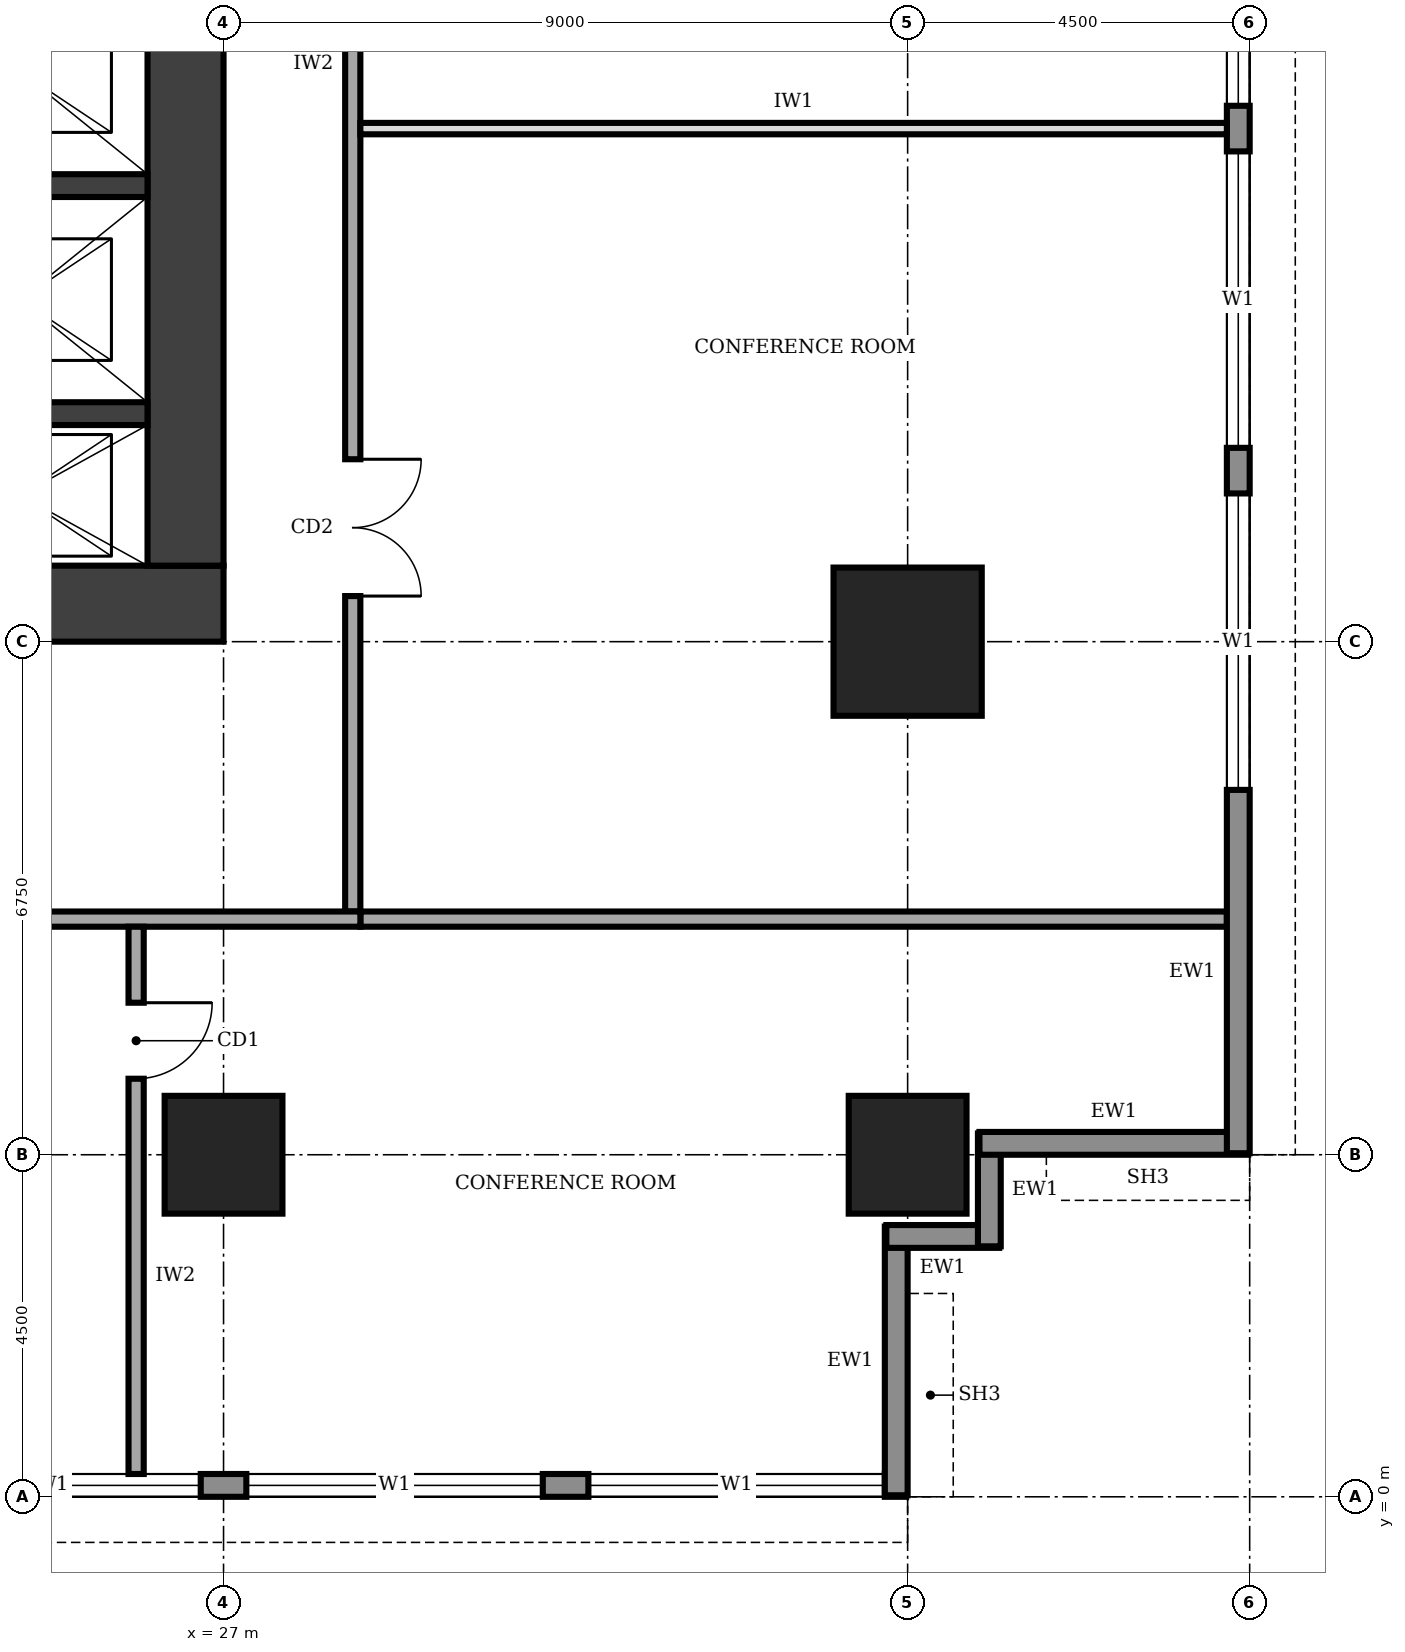
"""IFC4 building model, lengths in metres.
Left out: names, types, materials, properties, quantities, classifications, styles, units other than length and angle.
Written with IfcOpenShell. Run it as: python <this file> out.ifc"""

import sys

from ifc_helpers import new_model, si_unit, direction, frame, frame_2d, origin, origin_2d, place, context, subcontext, project, spatial, rectangle, extrude, element, fill, save


model = new_model("IFC4")
c1 = context("Model", 3, precision=1e-05, world=origin(), true_north=direction((0.0, 1.0)))
c2 = subcontext(c1, "Body", "Model", "MODEL_VIEW")
j1 = project(units=[si_unit("LENGTHUNIT", "METRE"), si_unit("PLANEANGLEUNIT", "RADIAN")], contexts=[c1])
p1 = place(None, origin())
s1 = spatial("IfcSite", under=j1, at=p1, CompositionType="ELEMENT")
p2 = place(p1, origin())
s2 = spatial("IfcBuilding", under=s1, at=p2, CompositionType="ELEMENT")
p3 = place(p2, frame((0.0, 0.0, 213.0)))
s3 = spatial("IfcBuildingStorey", under=s2, at=p3, CompositionType="ELEMENT", Elevation=213.0)
p4 = place(p3, frame((13.5, 11.75, 0.0), z_axis=(0.0, 0.0, 1.0), x_axis=(1.0, 0.0, 0.0)))
e1 = element("IfcWall", 1, at=p4, inside=s3, PredefinedType="SHEAR", context=c2, shape_type="SweptSolid", body=[
    extrude(rectangle(XDim=13.5, YDim=1.0, at=frame_2d((6.75, 0.0))), origin(), (0.0, 0.0, 1.0), 4.0),
])
p5 = place(p4, frame((4.75, 0.0, 0.0)))
e2 = element("IfcOpeningElement", 2, at=p5, cuts=e1, PredefinedType="OPENING", context=c2, shape_type="SweptSolid", body=[
    extrude(rectangle(XDim=1.0, YDim=2.1, at=frame_2d((0.5, 1.05))), frame((0.0, 0.51, 0.0), z_axis=(0.0, -1.0, 0.0), x_axis=(1.0, 0.0, 0.0)), (0.0, 0.0, 1.0), 1.02),
])
p6 = place(p3, frame((26.5, 12.25, 0.0), z_axis=(0.0, 0.0, 1.0), x_axis=(0.0, 1.0, 0.0)))
e3 = element("IfcWall", 3, at=p6, inside=s3, PredefinedType="SHEAR", context=c2, shape_type="SweptSolid", body=[
    extrude(rectangle(XDim=16.0, YDim=1.0, at=frame_2d((8.0, 0.0))), origin(), (0.0, 0.0, 1.0), 4.0),
])
for number, where, z_axis, x_axis in (
    (4, (22.65, 14.25, 0.0), (0.0, 0.0, 1.0), (1.0, 0.0, 0.0)),
    (5, (22.65, 17.25, 0.0), (0.0, 0.0, 1.0), (1.0, 0.0, 0.0)),
):
    element("IfcWall", number, at=place(p3, frame(where, z_axis=z_axis, x_axis=x_axis)), inside=s3, PredefinedType="SHEAR", context=c2, shape_type="SweptSolid", body=[
        extrude(rectangle(XDim=3.35, YDim=0.3, at=frame_2d((1.675, 0.0))), origin(), (0.0, 0.0, 1.0), 4.0),
    ])
for number, where, z_axis, x_axis in (
    (6, (27.0, 4.5, 0.0), (0.0, 0.0, 1.0), (1.0, 0.0, 0.0)),
    (7, (36.0, 4.5, 0.0), (0.0, 0.0, 1.0), (1.0, 0.0, 0.0)),
):
    element("IfcColumn", number, at=place(p3, frame(where, z_axis=z_axis, x_axis=x_axis)), inside=s3, PredefinedType="COLUMN", context=c2, shape_type="SweptSolid", body=[
        extrude(rectangle(XDim=1.55, YDim=1.55, at=origin_2d()), origin(), (0.0, 0.0, 1.0), 4.0),
    ])
p7 = place(p3, frame((36.0, 11.25, 0.0), z_axis=(0.0, 0.0, 1.0), x_axis=(1.0, 0.0, 0.0)))
e8 = element("IfcColumn", 8, at=p7, inside=s3, PredefinedType="COLUMN", context=c2, shape_type="SweptSolid", body=[
    extrude(rectangle(XDim=1.95, YDim=1.95, at=origin_2d()), origin(), (0.0, 0.0, 1.0), 4.0),
])
p8 = place(p3, frame((4.52, 0.15, 0.0), z_axis=(0.0, 0.0, 1.0), x_axis=(1.0, 0.0, 0.0)))
e9 = element("IfcWall", 9, at=p8, inside=s3, PredefinedType="STANDARD", context=c2, shape_type="SweptSolid", body=[
    extrude(rectangle(XDim=31.46, YDim=0.3, at=frame_2d((15.73, 0.0))), origin(), (0.0, 0.0, 1.0), 3.75),
])
p9 = place(p8, frame((4.78, 0.0, 0.9)))
e10 = element("IfcOpeningElement", 10, at=p9, cuts=e9, PredefinedType="OPENING", context=c2, shape_type="SweptSolid", body=[
    extrude(rectangle(XDim=3.9, YDim=2.2, at=frame_2d((1.95, 1.1))), frame((0.0, 0.16, 0.0), z_axis=(0.0, -1.0, 0.0), x_axis=(1.0, 0.0, 0.0)), (0.0, 0.0, 1.0), 0.32),
])
p10 = place(p8, frame((9.28, 0.0, 0.9)))
e11 = element("IfcOpeningElement", 11, at=p10, cuts=e9, PredefinedType="OPENING", context=c2, shape_type="SweptSolid", body=[
    extrude(rectangle(XDim=3.9, YDim=2.2, at=frame_2d((1.95, 1.1))), frame((0.0, 0.16, 0.0), z_axis=(0.0, -1.0, 0.0), x_axis=(1.0, 0.0, 0.0)), (0.0, 0.0, 1.0), 0.32),
])
p11 = place(p8, frame((13.78, 0.0, 0.9)))
e12 = element("IfcOpeningElement", 12, at=p11, cuts=e9, PredefinedType="OPENING", context=c2, shape_type="SweptSolid", body=[
    extrude(rectangle(XDim=3.9, YDim=2.2, at=frame_2d((1.95, 1.1))), frame((0.0, 0.16, 0.0), z_axis=(0.0, -1.0, 0.0), x_axis=(1.0, 0.0, 0.0)), (0.0, 0.0, 1.0), 0.32),
])
p12 = place(p8, frame((18.28, 0.0, 0.9)))
e13 = element("IfcOpeningElement", 13, at=p12, cuts=e9, PredefinedType="OPENING", context=c2, shape_type="SweptSolid", body=[
    extrude(rectangle(XDim=3.9, YDim=2.2, at=frame_2d((1.95, 1.1))), frame((0.0, 0.16, 0.0), z_axis=(0.0, -1.0, 0.0), x_axis=(1.0, 0.0, 0.0)), (0.0, 0.0, 1.0), 0.32),
])
p13 = place(p8, frame((22.78, 0.0, 0.9)))
e14 = element("IfcOpeningElement", 14, at=p13, cuts=e9, PredefinedType="OPENING", context=c2, shape_type="SweptSolid", body=[
    extrude(rectangle(XDim=3.9, YDim=2.2, at=frame_2d((1.95, 1.1))), frame((0.0, 0.16, 0.0), z_axis=(0.0, -1.0, 0.0), x_axis=(1.0, 0.0, 0.0)), (0.0, 0.0, 1.0), 0.32),
])
p14 = place(p8, frame((27.28, 0.0, 0.9)))
e15 = element("IfcOpeningElement", 15, at=p14, cuts=e9, PredefinedType="OPENING", context=c2, shape_type="SweptSolid", body=[
    extrude(rectangle(XDim=3.9, YDim=2.2, at=frame_2d((1.95, 1.1))), frame((0.0, 0.16, 0.0), z_axis=(0.0, -1.0, 0.0), x_axis=(1.0, 0.0, 0.0)), (0.0, 0.0, 1.0), 0.32),
])
p15 = place(p3, frame((35.85, 0.02, 0.0), z_axis=(0.0, 0.0, 1.0), x_axis=(0.0, 1.0, 0.0)))
e16 = element("IfcWall", 16, at=p15, inside=s3, PredefinedType="STANDARD", context=c2, shape_type="SweptSolid", body=[
    extrude(rectangle(XDim=3.535, YDim=0.3, at=frame_2d((1.768, 0.0))), origin(), (0.0, 0.0, 1.0), 2.85),
])
for number, where, z_axis, x_axis in (
    (17, (35.72, 3.425, 0.0), (0.0, 0.0, 1.0), (1.0, 0.0, 0.0)),
    (18, (37.075, 3.295, 0.0), (0.0, 0.0, 1.0), (0.0, 1.0, 0.0)),
):
    element("IfcWall", number, at=place(p3, frame(where, z_axis=z_axis, x_axis=x_axis)), inside=s3, PredefinedType="STANDARD", context=c2, shape_type="SweptSolid", body=[
        extrude(rectangle(XDim=1.485, YDim=0.3, at=frame_2d((0.743, 0.0))), origin(), (0.0, 0.0, 1.0), 3.75),
    ])
p16 = place(p3, frame((36.945, 4.65, 0.0), z_axis=(0.0, 0.0, 1.0), x_axis=(1.0, 0.0, 0.0)))
e19 = element("IfcWall", 19, at=p16, inside=s3, PredefinedType="STANDARD", context=c2, shape_type="SweptSolid", body=[
    extrude(rectangle(XDim=3.535, YDim=0.3, at=frame_2d((1.768, 0.0))), origin(), (0.0, 0.0, 1.0), 2.85),
])
p17 = place(p3, frame((40.35, 4.52, 0.0), z_axis=(0.0, 0.0, 1.0), x_axis=(0.0, 1.0, 0.0)))
e20 = element("IfcWall", 20, at=p17, inside=s3, PredefinedType="STANDARD", context=c2, shape_type="SweptSolid", body=[
    extrude(rectangle(XDim=31.46, YDim=0.3, at=frame_2d((15.73, 0.0))), origin(), (0.0, 0.0, 1.0), 3.75),
])
p18 = place(p17, frame((4.78, 0.0, 0.9)))
e21 = element("IfcOpeningElement", 21, at=p18, cuts=e20, PredefinedType="OPENING", context=c2, shape_type="SweptSolid", body=[
    extrude(rectangle(XDim=3.9, YDim=2.2, at=frame_2d((1.95, 1.1))), frame((0.0, 0.16, 0.0), z_axis=(0.0, -1.0, 0.0), x_axis=(1.0, 0.0, 0.0)), (0.0, 0.0, 1.0), 0.32),
])
p19 = place(p17, frame((9.28, 0.0, 0.9)))
e22 = element("IfcOpeningElement", 22, at=p19, cuts=e20, PredefinedType="OPENING", context=c2, shape_type="SweptSolid", body=[
    extrude(rectangle(XDim=3.9, YDim=2.2, at=frame_2d((1.95, 1.1))), frame((0.0, 0.16, 0.0), z_axis=(0.0, -1.0, 0.0), x_axis=(1.0, 0.0, 0.0)), (0.0, 0.0, 1.0), 0.32),
])
p20 = place(p17, frame((13.78, 0.0, 0.9)))
e23 = element("IfcOpeningElement", 23, at=p20, cuts=e20, PredefinedType="OPENING", context=c2, shape_type="SweptSolid", body=[
    extrude(rectangle(XDim=3.9, YDim=2.2, at=frame_2d((1.95, 1.1))), frame((0.0, 0.16, 0.0), z_axis=(0.0, -1.0, 0.0), x_axis=(1.0, 0.0, 0.0)), (0.0, 0.0, 1.0), 0.32),
])
p21 = place(p17, frame((18.28, 0.0, 0.9)))
e24 = element("IfcOpeningElement", 24, at=p21, cuts=e20, PredefinedType="OPENING", context=c2, shape_type="SweptSolid", body=[
    extrude(rectangle(XDim=3.9, YDim=2.2, at=frame_2d((1.95, 1.1))), frame((0.0, 0.16, 0.0), z_axis=(0.0, -1.0, 0.0), x_axis=(1.0, 0.0, 0.0)), (0.0, 0.0, 1.0), 0.32),
])
p22 = place(p17, frame((22.78, 0.0, 0.9)))
e25 = element("IfcOpeningElement", 25, at=p22, cuts=e20, PredefinedType="OPENING", context=c2, shape_type="SweptSolid", body=[
    extrude(rectangle(XDim=3.9, YDim=2.2, at=frame_2d((1.95, 1.1))), frame((0.0, 0.16, 0.0), z_axis=(0.0, -1.0, 0.0), x_axis=(1.0, 0.0, 0.0)), (0.0, 0.0, 1.0), 0.32),
])
p23 = place(p17, frame((27.28, 0.0, 0.9)))
e26 = element("IfcOpeningElement", 26, at=p23, cuts=e20, PredefinedType="OPENING", context=c2, shape_type="SweptSolid", body=[
    extrude(rectangle(XDim=3.9, YDim=2.2, at=frame_2d((1.95, 1.1))), frame((0.0, 0.16, 0.0), z_axis=(0.0, -1.0, 0.0), x_axis=(1.0, 0.0, 0.0)), (0.0, 0.0, 1.0), 0.32),
])
p24 = place(p3, frame((11.9, 7.6, 0.0), z_axis=(0.0, 0.0, 1.0), x_axis=(1.0, 0.0, 0.0)))
e27 = element("IfcWall", 27, at=p24, inside=s3, PredefinedType="SOLIDWALL", context=c2, shape_type="SweptSolid", body=[
    extrude(rectangle(XDim=16.9, YDim=0.2, at=frame_2d((8.45, 0.0))), origin(), (0.0, 0.0, 1.0), 3.75),
])
p25 = place(p3, frame((28.7, 7.7, 0.0), z_axis=(0.0, 0.0, 1.0), x_axis=(0.0, 1.0, 0.0)))
e28 = element("IfcWall", 28, at=p25, inside=s3, PredefinedType="SOLIDWALL", context=c2, shape_type="SweptSolid", body=[
    extrude(rectangle(XDim=23.8, YDim=0.2, at=frame_2d((11.9, 0.0))), origin(), (0.0, 0.0, 1.0), 3.75),
])
p26 = place(p25, frame((4.15, 0.0, 0.0)))
e29 = element("IfcOpeningElement", 29, at=p26, cuts=e28, PredefinedType="OPENING", context=c2, shape_type="SweptSolid", body=[
    extrude(rectangle(XDim=1.8, YDim=2.1, at=frame_2d((0.9, 1.05))), frame((0.0, 0.11, 0.0), z_axis=(0.0, -1.0, 0.0), x_axis=(1.0, 0.0, 0.0)), (0.0, 0.0, 1.0), 0.22),
])
p27 = place(p25, frame((16.35, 0.0, 0.0)))
e30 = element("IfcOpeningElement", 30, at=p27, cuts=e28, PredefinedType="OPENING", context=c2, shape_type="SweptSolid", body=[
    extrude(rectangle(XDim=1.4, YDim=2.1, at=frame_2d((0.7, 1.05))), frame((0.0, 0.11, 0.0), z_axis=(0.0, -1.0, 0.0), x_axis=(1.0, 0.0, 0.0)), (0.0, 0.0, 1.0), 0.22),
])
p28 = place(p3, frame((25.85, 7.5, 0.0), z_axis=(0.0, 0.0, 1.0), x_axis=(0.0, -1.0, 0.0)))
e31 = element("IfcWall", 31, at=p28, inside=s3, PredefinedType="SOLIDWALL", context=c2, shape_type="SweptSolid", body=[
    extrude(rectangle(XDim=7.2, YDim=0.2, at=frame_2d((3.6, 0.0))), origin(), (0.0, 0.0, 1.0), 3.75),
])
p29 = place(p28, frame((1.0, 0.0, 0.0)))
e32 = element("IfcOpeningElement", 32, at=p29, cuts=e31, PredefinedType="OPENING", context=c2, shape_type="SweptSolid", body=[
    extrude(rectangle(XDim=1.0, YDim=2.1, at=frame_2d((0.5, 1.05))), frame((0.0, 0.11, 0.0), z_axis=(0.0, -1.0, 0.0), x_axis=(1.0, 0.0, 0.0)), (0.0, 0.0, 1.0), 0.22),
])
p30 = place(p3, frame((28.8, 7.6, 0.0), z_axis=(0.0, 0.0, 1.0), x_axis=(1.0, 0.0, 0.0)))
e33 = element("IfcWall", 33, at=p30, inside=s3, PredefinedType="SOLIDWALL", context=c2, shape_type="SweptSolid", body=[
    extrude(rectangle(XDim=11.4, YDim=0.2, at=frame_2d((5.7, 0.0))), origin(), (0.0, 0.0, 1.0), 3.75),
])
p31 = place(p3, frame((28.8, 18.0, 0.0), z_axis=(0.0, 0.0, 1.0), x_axis=(1.0, 0.0, 0.0)))
e34 = element("IfcWall", 34, at=p31, inside=s3, PredefinedType="PARTITIONING", context=c2, shape_type="SweptSolid", body=[
    extrude(rectangle(XDim=11.4, YDim=0.15, at=frame_2d((5.7, 0.0))), origin(), (0.0, 0.0, 1.0), 3.75),
])
p32 = place(p12, origin())
e35 = element("IfcWindow", 35, at=p32, inside=s3, PartitioningType="SINGLE_PANEL", PredefinedType="WINDOW", context=c2, shape_type="SweptSolid", body=[
    extrude(rectangle(XDim=3.9, YDim=2.2, at=frame_2d((1.95, 1.1))), frame((0.0, 0.03, 0.0), z_axis=(0.0, -1.0, 0.0), x_axis=(1.0, 0.0, 0.0)), (0.0, 0.0, 1.0), 0.06),
])
fill(e13, e35)
p33 = place(p13, origin())
e36 = element("IfcWindow", 36, at=p33, inside=s3, PartitioningType="SINGLE_PANEL", PredefinedType="WINDOW", context=c2, shape_type="SweptSolid", body=[
    extrude(rectangle(XDim=3.9, YDim=2.2, at=frame_2d((1.95, 1.1))), frame((0.0, 0.03, 0.0), z_axis=(0.0, -1.0, 0.0), x_axis=(1.0, 0.0, 0.0)), (0.0, 0.0, 1.0), 0.06),
])
fill(e14, e36)
p34 = place(p14, origin())
e37 = element("IfcWindow", 37, at=p34, inside=s3, PartitioningType="SINGLE_PANEL", PredefinedType="WINDOW", context=c2, shape_type="SweptSolid", body=[
    extrude(rectangle(XDim=3.9, YDim=2.2, at=frame_2d((1.95, 1.1))), frame((0.0, 0.03, 0.0), z_axis=(0.0, -1.0, 0.0), x_axis=(1.0, 0.0, 0.0)), (0.0, 0.0, 1.0), 0.06),
])
fill(e15, e37)
p35 = place(p18, origin())
e38 = element("IfcWindow", 38, at=p35, inside=s3, PartitioningType="SINGLE_PANEL", PredefinedType="WINDOW", context=c2, shape_type="SweptSolid", body=[
    extrude(rectangle(XDim=3.9, YDim=2.2, at=frame_2d((1.95, 1.1))), frame((0.0, 0.03, 0.0), z_axis=(0.0, -1.0, 0.0), x_axis=(1.0, 0.0, 0.0)), (0.0, 0.0, 1.0), 0.06),
])
fill(e21, e38)
p36 = place(p19, origin())
e39 = element("IfcWindow", 39, at=p36, inside=s3, PartitioningType="SINGLE_PANEL", PredefinedType="WINDOW", context=c2, shape_type="SweptSolid", body=[
    extrude(rectangle(XDim=3.9, YDim=2.2, at=frame_2d((1.95, 1.1))), frame((0.0, 0.03, 0.0), z_axis=(0.0, -1.0, 0.0), x_axis=(1.0, 0.0, 0.0)), (0.0, 0.0, 1.0), 0.06),
])
fill(e22, e39)
p37 = place(p20, origin())
e40 = element("IfcWindow", 40, at=p37, inside=s3, PartitioningType="SINGLE_PANEL", PredefinedType="WINDOW", context=c2, shape_type="SweptSolid", body=[
    extrude(rectangle(XDim=3.9, YDim=2.2, at=frame_2d((1.95, 1.1))), frame((0.0, 0.03, 0.0), z_axis=(0.0, -1.0, 0.0), x_axis=(1.0, 0.0, 0.0)), (0.0, 0.0, 1.0), 0.06),
])
fill(e23, e40)
p38 = place(p26, frame((1.8, 0.0, 0.0), z_axis=(0.0, 0.0, 1.0), x_axis=(-1.0, 0.0, 0.0)))
e41 = element("IfcDoor", 41, at=p38, inside=s3, OperationType="DOUBLE_DOOR_SINGLE_SWING", PredefinedType="DOOR", context=c2, shape_type="SweptSolid", body=[
    extrude(rectangle(XDim=1.8, YDim=2.1, at=frame_2d((0.9, 1.05))), frame((0.0, 0.025, 0.0), z_axis=(0.0, -1.0, 0.0), x_axis=(1.0, 0.0, 0.0)), (0.0, 0.0, 1.0), 0.05),
])
fill(e29, e41)
p39 = place(p29, origin())
e42 = element("IfcDoor", 42, at=p39, inside=s3, OperationType="SINGLE_SWING_LEFT", PredefinedType="DOOR", context=c2, shape_type="SweptSolid", body=[
    extrude(rectangle(XDim=1.0, YDim=2.1, at=frame_2d((0.5, 1.05))), frame((0.0, 0.025, 0.0), z_axis=(0.0, -1.0, 0.0), x_axis=(1.0, 0.0, 0.0)), (0.0, 0.0, 1.0), 0.05),
])
fill(e32, e42)
save(model, sys.argv[1])
